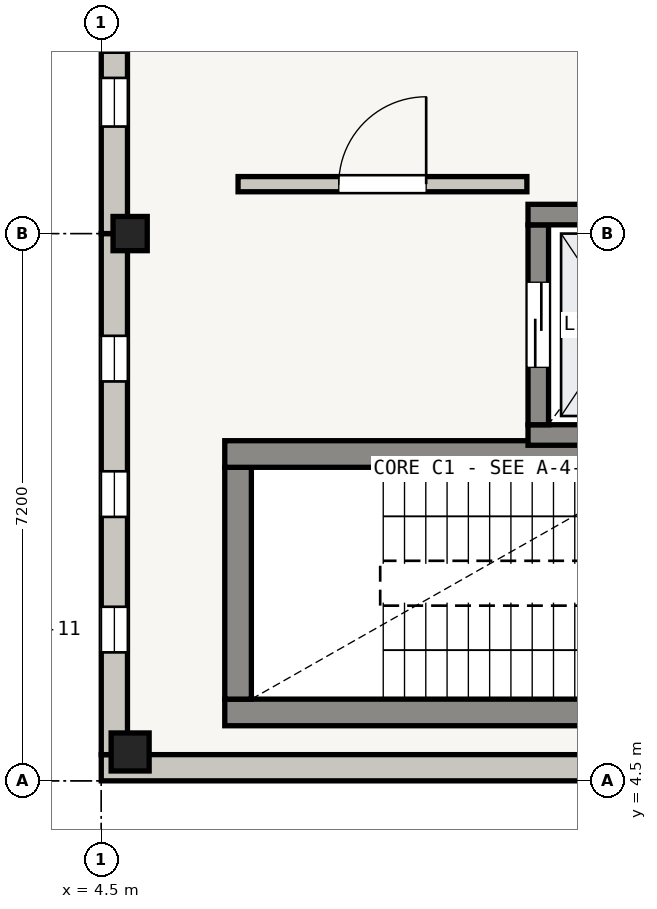
"""IFC4 building model, lengths in metres.
Left out: names, types, materials, properties, quantities, classifications, styles, units other than length and angle.
Written with IfcOpenShell. Run it as: python <this file> out.ifc"""

import sys

from ifc_helpers import new_model, si_unit, direction, frame, frame_2d, origin, origin_2d, place, context, subcontext, project, spatial, rectangle, extrude, element, fill, save


model = new_model("IFC4")
c1 = context("Model", 3, precision=1e-05, world=origin(), true_north=direction((0.0, 1.0)))
c2 = subcontext(c1, "Body", "Model", "MODEL_VIEW")
j1 = project(units=[si_unit("LENGTHUNIT", "METRE"), si_unit("PLANEANGLEUNIT", "RADIAN")], contexts=[c1])
p1 = place(None, origin())
s1 = spatial("IfcSite", under=j1, at=p1, CompositionType="ELEMENT")
p2 = place(p1, origin())
s2 = spatial("IfcBuilding", under=s1, at=p2, CompositionType="ELEMENT")
p3 = place(p2, frame((0.0, 0.0, 8.7)))
s3 = spatial("IfcBuildingStorey", under=s2, at=p3, CompositionType="ELEMENT", Elevation=8.7)
p4 = place(p3, frame((4.88, 4.88, 0.0), z_axis=(0.0, 0.0, 1.0), x_axis=(1.0, 0.0, 0.0)))
e1 = element("IfcColumn", 1, at=p4, inside=s3, PredefinedType="COLUMN", context=c2, shape_type="SweptSolid", body=[
    extrude(rectangle(XDim=0.5, YDim=0.5, at=origin_2d()), origin(), (0.0, 0.0, 1.0), 3.92),
])
p5 = place(p3, frame((4.88, 11.7, 0.0), z_axis=(0.0, 0.0, 1.0), x_axis=(1.0, 0.0, 0.0)))
e2 = element("IfcColumn", 2, at=p5, inside=s3, PredefinedType="COLUMN", context=c2, shape_type="SweptSolid", body=[
    extrude(rectangle(XDim=0.45, YDim=0.45, at=origin_2d()), origin(), (0.0, 0.0, 1.0), 3.92),
])
p6 = place(p3, frame((11.7, 4.673, 0.0), z_axis=(0.0, 0.0, 1.0), x_axis=(-1.0, 0.0, 0.0)))
e3 = element("IfcWall", 3, at=p6, inside=s3, PredefinedType="SOLIDWALL", context=c2, shape_type="SweptSolid", body=[
    extrude(rectangle(XDim=7.2, YDim=0.345, at=frame_2d((3.6, 0.0))), origin(), (0.0, 0.0, 1.0), 3.285),
])
p7 = place(p3, frame((4.673, 4.845, 0.0), z_axis=(0.0, 0.0, 1.0), x_axis=(0.0, 1.0, 0.0)))
e4 = element("IfcWall", 4, at=p7, inside=s3, PredefinedType="SOLIDWALL", context=c2, shape_type="SweptSolid", body=[
    extrude(rectangle(XDim=6.855, YDim=0.345, at=frame_2d((3.427, 0.0))), origin(), (0.0, 0.0, 1.0), 3.325),
])
p8 = place(p7, frame((1.345, 0.0, 0.55)))
e5 = element("IfcOpeningElement", 5, at=p8, cuts=e4, PredefinedType="OPENING", context=c2, shape_type="SweptSolid", body=[
    extrude(rectangle(XDim=0.6, YDim=2.28, at=frame_2d((0.3, 1.14))), frame((0.0, 0.172, 0.0), z_axis=(0.0, -1.0, 0.0), x_axis=(1.0, 0.0, 0.0)), (0.0, 0.0, 1.0), 0.345),
])
p9 = place(p7, frame((3.127, 0.0, 0.55)))
e6 = element("IfcOpeningElement", 6, at=p9, cuts=e4, PredefinedType="OPENING", context=c2, shape_type="SweptSolid", body=[
    extrude(rectangle(XDim=0.6, YDim=2.28, at=frame_2d((0.3, 1.14))), frame((0.0, 0.172, 0.0), z_axis=(0.0, -1.0, 0.0), x_axis=(1.0, 0.0, 0.0)), (0.0, 0.0, 1.0), 0.345),
])
p10 = place(p7, frame((4.91, 0.0, 0.55)))
e7 = element("IfcOpeningElement", 7, at=p10, cuts=e4, PredefinedType="OPENING", context=c2, shape_type="SweptSolid", body=[
    extrude(rectangle(XDim=0.6, YDim=2.28, at=frame_2d((0.3, 1.14))), frame((0.0, 0.172, 0.0), z_axis=(0.0, -1.0, 0.0), x_axis=(1.0, 0.0, 0.0)), (0.0, 0.0, 1.0), 0.345),
])
p11 = place(p3, frame((4.673, 11.7, 0.0), z_axis=(0.0, 0.0, 1.0), x_axis=(0.0, 1.0, 0.0)))
e8 = element("IfcWall", 8, at=p11, inside=s3, PredefinedType="SOLIDWALL", context=c2, shape_type="SweptSolid", body=[
    extrude(rectangle(XDim=7.2, YDim=0.345, at=frame_2d((3.6, 0.0))), origin(), (0.0, 0.0, 1.0), 3.255),
])
p12 = place(p11, frame((1.408, 0.0, 0.55)))
e9 = element("IfcOpeningElement", 9, at=p12, cuts=e8, PredefinedType="OPENING", context=c2, shape_type="SweptSolid", body=[
    extrude(rectangle(XDim=0.64, YDim=2.28, at=frame_2d((0.32, 1.14))), frame((0.0, 0.172, 0.0), z_axis=(0.0, -1.0, 0.0), x_axis=(1.0, 0.0, 0.0)), (0.0, 0.0, 1.0), 0.345),
])
p13 = place(p11, frame((2.38, 0.0, 0.55)))
e10 = element("IfcOpeningElement", 10, at=p13, cuts=e8, PredefinedType="OPENING", context=c2, shape_type="SweptSolid", body=[
    extrude(rectangle(XDim=0.64, YDim=2.28, at=frame_2d((0.32, 1.14))), frame((0.0, 0.172, 0.0), z_axis=(0.0, -1.0, 0.0), x_axis=(1.0, 0.0, 0.0)), (0.0, 0.0, 1.0), 0.345),
])
p14 = place(p3, frame((13.475, 5.4, 0.0), z_axis=(0.0, 0.0, 1.0), x_axis=(-1.0, 0.0, 0.0)))
e11 = element("IfcWall", 11, at=p14, inside=s3, PredefinedType="SHEAR", context=c2, shape_type="SweptSolid", body=[
    extrude(rectangle(XDim=7.35, YDim=0.35, at=frame_2d((3.675, 0.0))), origin(), (0.0, 0.0, 1.0), 3.92),
])
p15 = place(p3, frame((6.3, 5.575, 0.0), z_axis=(0.0, 0.0, 1.0), x_axis=(0.0, 1.0, 0.0)))
e12 = element("IfcWall", 12, at=p15, inside=s3, PredefinedType="SHEAR", context=c2, shape_type="SweptSolid", body=[
    extrude(rectangle(XDim=3.05, YDim=0.35, at=frame_2d((1.525, 0.0))), origin(), (0.0, 0.0, 1.0), 3.92),
])
p16 = place(p3, frame((6.125, 8.8, 0.0), z_axis=(0.0, 0.0, 1.0), x_axis=(1.0, 0.0, 0.0)))
e13 = element("IfcWall", 13, at=p16, inside=s3, PredefinedType="SHEAR", context=c2, shape_type="SweptSolid", body=[
    extrude(rectangle(XDim=7.35, YDim=0.35, at=frame_2d((3.675, 0.0))), origin(), (0.0, 0.0, 1.0), 3.92),
])
p17 = place(p3, frame((12.585, 9.05, 0.0), z_axis=(0.0, 0.0, 1.0), x_axis=(-1.0, 0.0, 0.0)))
e14 = element("IfcWall", 14, at=p17, inside=s3, PredefinedType="SHEAR", context=c2, shape_type="SweptSolid", body=[
    extrude(rectangle(XDim=2.47, YDim=0.27, at=frame_2d((1.235, 0.0))), origin(), (0.0, 0.0, 1.0), 3.92),
])
p18 = place(p3, frame((10.25, 9.185, 0.0), z_axis=(0.0, 0.0, 1.0), x_axis=(0.0, 1.0, 0.0)))
e15 = element("IfcWall", 15, at=p18, inside=s3, PredefinedType="SHEAR", context=c2, shape_type="SweptSolid", body=[
    extrude(rectangle(XDim=2.63, YDim=0.27, at=frame_2d((1.315, 0.0))), origin(), (0.0, 0.0, 1.0), 3.92),
])
p19 = place(p18, frame((0.755, 0.0, 0.0)))
e16 = element("IfcOpeningElement", 16, at=p19, cuts=e15, PredefinedType="OPENING", context=c2, shape_type="SweptSolid", body=[
    extrude(rectangle(XDim=1.12, YDim=2.1, at=frame_2d((0.56, 1.05))), frame((0.0, 0.135, 0.0), z_axis=(0.0, -1.0, 0.0), x_axis=(1.0, 0.0, 0.0)), (0.0, 0.0, 1.0), 0.27),
])
p20 = place(p3, frame((10.115, 11.95, 0.0), z_axis=(0.0, 0.0, 1.0), x_axis=(1.0, 0.0, 0.0)))
e17 = element("IfcWall", 17, at=p20, inside=s3, PredefinedType="SHEAR", context=c2, shape_type="SweptSolid", body=[
    extrude(rectangle(XDim=2.47, YDim=0.27, at=frame_2d((1.235, 0.0))), origin(), (0.0, 0.0, 1.0), 3.92),
])
p21 = place(p3, frame((6.3, 12.35, 0.0), z_axis=(0.0, 0.0, 1.0), x_axis=(1.0, 0.0, 0.0)))
e18 = element("IfcWall", 18, at=p21, inside=s3, PredefinedType="SOLIDWALL", context=c2, shape_type="SweptSolid", body=[
    extrude(rectangle(XDim=3.8, YDim=0.2, at=frame_2d((1.9, 0.0))), origin(), (0.0, 0.0, 1.0), 2.94),
])
p22 = place(p21, frame((1.325, 0.0, 0.0)))
e19 = element("IfcOpeningElement", 19, at=p22, cuts=e18, PredefinedType="OPENING", context=c2, shape_type="SweptSolid", body=[
    extrude(rectangle(XDim=1.15, YDim=2.05, at=frame_2d((0.575, 1.025))), frame((0.0, 0.1, 0.0), z_axis=(0.0, -1.0, 0.0), x_axis=(1.0, 0.0, 0.0)), (0.0, 0.0, 1.0), 0.2),
])
p23 = place(p8, origin())
e20 = element("IfcWindow", 20, at=p23, inside=s3, PartitioningType="SINGLE_PANEL", PredefinedType="WINDOW", context=c2, shape_type="SweptSolid", body=[
    extrude(rectangle(XDim=0.6, YDim=2.28, at=frame_2d((0.3, 1.14))), frame((0.0, 0.03, 0.0), z_axis=(0.0, -1.0, 0.0), x_axis=(1.0, 0.0, 0.0)), (0.0, 0.0, 1.0), 0.06),
])
fill(e5, e20)
p24 = place(p9, origin())
e21 = element("IfcWindow", 21, at=p24, inside=s3, PartitioningType="SINGLE_PANEL", PredefinedType="WINDOW", context=c2, shape_type="SweptSolid", body=[
    extrude(rectangle(XDim=0.6, YDim=2.28, at=frame_2d((0.3, 1.14))), frame((0.0, 0.03, 0.0), z_axis=(0.0, -1.0, 0.0), x_axis=(1.0, 0.0, 0.0)), (0.0, 0.0, 1.0), 0.06),
])
fill(e6, e21)
p25 = place(p10, origin())
e22 = element("IfcWindow", 22, at=p25, inside=s3, PartitioningType="SINGLE_PANEL", PredefinedType="WINDOW", context=c2, shape_type="SweptSolid", body=[
    extrude(rectangle(XDim=0.6, YDim=2.28, at=frame_2d((0.3, 1.14))), frame((0.0, 0.03, 0.0), z_axis=(0.0, -1.0, 0.0), x_axis=(1.0, 0.0, 0.0)), (0.0, 0.0, 1.0), 0.06),
])
fill(e7, e22)
p26 = place(p12, origin())
e23 = element("IfcWindow", 23, at=p26, inside=s3, PartitioningType="SINGLE_PANEL", PredefinedType="WINDOW", context=c2, shape_type="SweptSolid", body=[
    extrude(rectangle(XDim=0.64, YDim=2.28, at=frame_2d((0.32, 1.14))), frame((0.0, 0.03, 0.0), z_axis=(0.0, -1.0, 0.0), x_axis=(1.0, 0.0, 0.0)), (0.0, 0.0, 1.0), 0.06),
])
fill(e9, e23)
p27 = place(p13, origin())
e24 = element("IfcWindow", 24, at=p27, inside=s3, PartitioningType="SINGLE_PANEL", PredefinedType="WINDOW", context=c2, shape_type="SweptSolid", body=[
    extrude(rectangle(XDim=0.64, YDim=2.28, at=frame_2d((0.32, 1.14))), frame((0.0, 0.03, 0.0), z_axis=(0.0, -1.0, 0.0), x_axis=(1.0, 0.0, 0.0)), (0.0, 0.0, 1.0), 0.06),
])
fill(e10, e24)
p28 = place(p19, origin())
e25 = element("IfcDoor", 25, at=p28, inside=s3, OperationType="DOUBLE_DOOR_SLIDING", PredefinedType="DOOR", context=c2, shape_type="SweptSolid", body=[
    extrude(rectangle(XDim=1.12, YDim=2.1, at=frame_2d((0.56, 1.05))), frame((0.0, 0.025, 0.0), z_axis=(0.0, -1.0, 0.0), x_axis=(1.0, 0.0, 0.0)), (0.0, 0.0, 1.0), 0.05),
])
fill(e16, e25)
p29 = place(p22, origin())
e26 = element("IfcDoor", 26, at=p29, inside=s3, OperationType="SINGLE_SWING_RIGHT", PredefinedType="DOOR", context=c2, shape_type="SweptSolid", body=[
    extrude(rectangle(XDim=1.15, YDim=2.05, at=frame_2d((0.575, 1.025))), frame((0.0, 0.025, 0.0), z_axis=(0.0, -1.0, 0.0), x_axis=(1.0, 0.0, 0.0)), (0.0, 0.0, 1.0), 0.05),
])
fill(e19, e26)
save(model, sys.argv[1])
